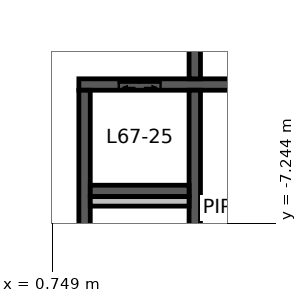
"""IFC4 building model, lengths in metres.
Left out: names, types, materials, properties, quantities, classifications, styles, units other than length and angle.
Written with IfcOpenShell. Run it as: python <this file> out.ifc"""

import sys

from ifc_helpers import new_model, si_unit, direction, frame, frame_2d, origin, place, context, subcontext, project, spatial, polyline, rectangle, outline, extrude, element, fill, save


model = new_model("IFC4")
c1 = context("Model", 3, precision=1e-05, world=origin(), true_north=direction((0.0, 1.0)))
c2 = subcontext(c1, "Body", "Model", "MODEL_VIEW")
j1 = project(units=[si_unit("LENGTHUNIT", "METRE"), si_unit("PLANEANGLEUNIT", "RADIAN")], contexts=[c1])
p1 = place(None, origin())
s1 = spatial("IfcSite", under=j1, at=p1, CompositionType="ELEMENT")
p2 = place(p1, origin())
s2 = spatial("IfcBuilding", under=s1, at=p2, CompositionType="ELEMENT")
p3 = place(p2, frame((0.0, 0.0, 267.4)))
s3 = spatial("IfcBuildingStorey", under=s2, at=p3, CompositionType="ELEMENT", Elevation=267.4)
p4 = place(p3, frame((1.45, -3.6, 0.0), z_axis=(0.0, 0.0, 1.0), x_axis=(1.0, 0.0, 0.0)))
e1 = element("IfcWall", 1, at=p4, inside=s3, PredefinedType="SHEAR", context=c2, shape_type="SweptSolid", body=[
    extrude(outline(polyline([(0.0, -0.15), (1.05, -0.15), (2.15, -0.15), (7.845, -0.15), (8.019, 0.15), (2.15, 0.15), (1.05, 0.15), (0.0, 0.15), (0.0, -0.15)])), origin(), (0.0, 0.0, 1.0), 3.9),
])
p5 = place(p4, frame((1.05, 0.0, 0.0)))
e2 = element("IfcOpeningElement", 2, at=p5, cuts=e1, PredefinedType="OPENING", context=c2, shape_type="SweptSolid", body=[
    extrude(rectangle(XDim=1.1, YDim=2.1, at=frame_2d((0.55, 1.05))), frame((0.0, 0.16, 0.0), z_axis=(0.0, -1.0, 0.0), x_axis=(1.0, 0.0, 0.0)), (0.0, 0.0, 1.0), 0.32),
])
p6 = place(p3, frame((1.6, -3.75, 0.0), z_axis=(0.0, 0.0, 1.0), x_axis=(0.0, -1.0, 0.0)))
e3 = element("IfcWall", 3, at=p6, inside=s3, PredefinedType="SHEAR", context=c2, shape_type="SweptSolid", body=[
    extrude(rectangle(XDim=6.175, YDim=0.3, at=frame_2d((3.087, 0.0))), origin(), (0.0, 0.0, 1.0), 3.9),
])
p7 = place(p6, frame((3.65, 0.0, 0.0)))
e4 = element("IfcOpeningElement", 4, at=p7, cuts=e3, PredefinedType="OPENING", context=c2, shape_type="SweptSolid", body=[
    extrude(rectangle(XDim=1.2, YDim=2.1, at=frame_2d((0.6, 1.05))), frame((0.0, 0.16, 0.0), z_axis=(0.0, -1.0, 0.0), x_axis=(1.0, 0.0, 0.0)), (0.0, 0.0, 1.0), 0.32),
])
p8 = place(p3, frame((4.5, -3.45, 0.0), z_axis=(0.0, 0.0, 1.0), x_axis=(0.0, 1.0, 0.0)))
e5 = element("IfcWall", 5, at=p8, inside=s3, PredefinedType="SHEAR", context=c2, shape_type="SweptSolid", body=[
    extrude(rectangle(XDim=6.9, YDim=0.3, at=frame_2d((3.45, 0.0))), origin(), (0.0, 0.0, 1.0), 3.9),
])
p9 = place(p8, frame((2.95, 0.0, 0.0)))
e6 = element("IfcOpeningElement", 6, at=p9, cuts=e5, PredefinedType="OPENING", context=c2, shape_type="SweptSolid", body=[
    extrude(rectangle(XDim=1.0, YDim=2.1, at=frame_2d((0.5, 1.05))), frame((0.0, 0.16, 0.0), z_axis=(0.0, -1.0, 0.0), x_axis=(1.0, 0.0, 0.0)), (0.0, 0.0, 1.0), 0.32),
])
p10 = place(p3, frame((4.5, -3.75, 0.0), z_axis=(0.0, 0.0, 1.0), x_axis=(0.0, -1.0, 0.0)))
e7 = element("IfcWall", 7, at=p10, inside=s3, PredefinedType="SHEAR", context=c2, shape_type="SweptSolid", body=[
    extrude(rectangle(XDim=6.175, YDim=0.3, at=frame_2d((3.087, 0.0))), origin(), (0.0, 0.0, 1.0), 3.9),
])
p11 = place(p3, frame((1.75, -6.4, 0.0), z_axis=(0.0, 0.0, 1.0), x_axis=(1.0, 0.0, 0.0)))
e8 = element("IfcWall", 8, at=p11, inside=s3, PredefinedType="SHEAR", context=c2, shape_type="SweptSolid", body=[
    extrude(rectangle(XDim=2.6, YDim=0.3, at=frame_2d((1.3, 0.0))), origin(), (0.0, 0.0, 1.0), 3.9),
])
p12 = place(p3, frame((1.75, -6.675, 0.0), z_axis=(0.0, 0.0, 1.0), x_axis=(1.0, 0.0, 0.0)))
e9 = element("IfcWall", 9, at=p12, inside=s3, PredefinedType="PLUMBINGWALL", context=c2, shape_type="SweptSolid", body=[
    extrude(rectangle(XDim=2.6, YDim=0.25, at=frame_2d((1.3, 0.0))), origin(), (0.0, 0.0, 1.0), 3.9),
])
p13 = place(p5, origin())
e10 = element("IfcDoor", 10, at=p13, inside=s3, OperationType="DOUBLE_DOOR_SLIDING", PredefinedType="DOOR", context=c2, shape_type="SweptSolid", body=[
    extrude(rectangle(XDim=1.1, YDim=2.1, at=frame_2d((0.55, 1.05))), frame((0.0, 0.025, 0.0), z_axis=(0.0, -1.0, 0.0), x_axis=(1.0, 0.0, 0.0)), (0.0, 0.0, 1.0), 0.05),
])
fill(e2, e10)
save(model, sys.argv[1])
